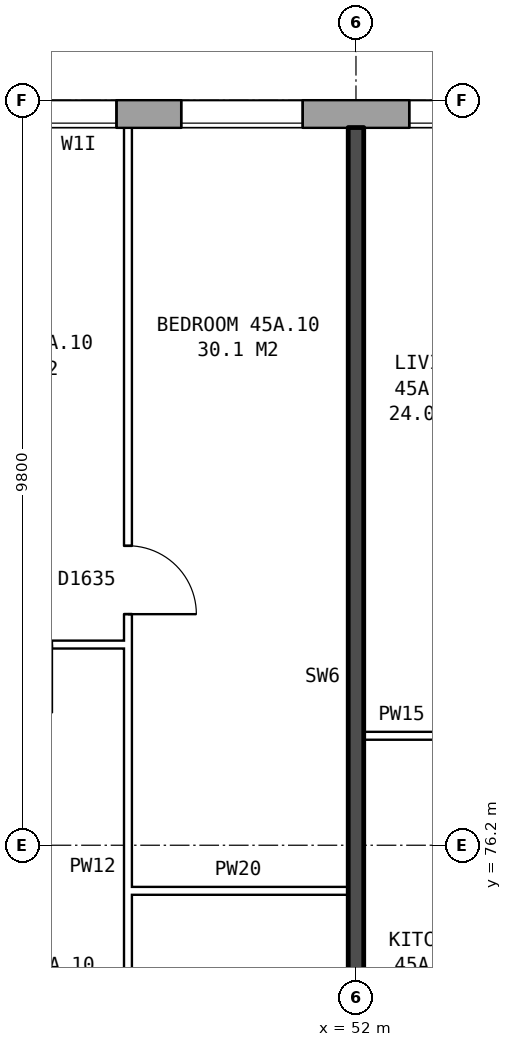
"""IFC4 building model, lengths in metres.
Left out: names, types, materials, properties, quantities, classifications, styles, units other than length and angle.
Written with IfcOpenShell. Run it as: python <this file> out.ifc"""

import sys

from ifc_helpers import new_model, si_unit, direction, frame, frame_2d, origin, place, context, subcontext, project, spatial, rectangle, extrude, element, fill, save


model = new_model("IFC4")
c1 = context("Model", 3, precision=1e-05, world=origin(), true_north=direction((0.0, 1.0)))
c2 = subcontext(c1, "Body", "Model", "MODEL_VIEW")
j1 = project(units=[si_unit("LENGTHUNIT", "METRE"), si_unit("PLANEANGLEUNIT", "RADIAN")], contexts=[c1])
p1 = place(None, origin())
s1 = spatial("IfcSite", under=j1, at=p1, CompositionType="ELEMENT")
p2 = place(p1, origin())
s2 = spatial("IfcBuilding", under=s1, at=p2, CompositionType="ELEMENT")
p3 = place(p2, frame((0.0, 0.0, 160.9)))
s3 = spatial("IfcBuildingStorey", under=s2, at=p3, CompositionType="ELEMENT", Elevation=160.9)
p4 = place(p3, frame((72.925, 85.82, 0.0), z_axis=(0.0, 0.0, 1.0), x_axis=(-1.0, 0.0, 0.0)))
e1 = element("IfcWall", 1, at=p4, inside=s3, PredefinedType="STANDARD", context=c2, shape_type="SweptSolid", body=[
    extrude(rectangle(XDim=41.351, YDim=0.36, at=frame_2d((20.675, 0.0))), origin(), (0.0, 0.0, 1.0), 2.85),
])
p5 = place(p4, frame((0.625, 0.0, 0.8)))
e2 = element("IfcOpeningElement", 2, at=p5, cuts=e1, PredefinedType="OPENING", context=c2, shape_type="SweptSolid", body=[
    extrude(rectangle(XDim=1.6, YDim=1.8, at=frame_2d((0.8, 0.9))), frame((0.0, 0.19, 0.0), z_axis=(0.0, -1.0, 0.0), x_axis=(1.0, 0.0, 0.0)), (0.0, 0.0, 1.0), 0.38),
])
p6 = place(p4, frame((3.625, 0.0, 0.8)))
e3 = element("IfcOpeningElement", 3, at=p6, cuts=e1, PredefinedType="OPENING", context=c2, shape_type="SweptSolid", body=[
    extrude(rectangle(XDim=1.6, YDim=1.8, at=frame_2d((0.8, 0.9))), frame((0.0, 0.19, 0.0), z_axis=(0.0, -1.0, 0.0), x_axis=(1.0, 0.0, 0.0)), (0.0, 0.0, 1.0), 0.38),
])
p7 = place(p4, frame((6.625, 0.0, 0.8)))
e4 = element("IfcOpeningElement", 4, at=p7, cuts=e1, PredefinedType="OPENING", context=c2, shape_type="SweptSolid", body=[
    extrude(rectangle(XDim=1.6, YDim=1.8, at=frame_2d((0.8, 0.9))), frame((0.0, 0.19, 0.0), z_axis=(0.0, -1.0, 0.0), x_axis=(1.0, 0.0, 0.0)), (0.0, 0.0, 1.0), 0.38),
])
p8 = place(p4, frame((9.625, 0.0, 0.8)))
e5 = element("IfcOpeningElement", 5, at=p8, cuts=e1, PredefinedType="OPENING", context=c2, shape_type="SweptSolid", body=[
    extrude(rectangle(XDim=1.6, YDim=1.8, at=frame_2d((0.8, 0.9))), frame((0.0, 0.19, 0.0), z_axis=(0.0, -1.0, 0.0), x_axis=(1.0, 0.0, 0.0)), (0.0, 0.0, 1.0), 0.38),
])
p9 = place(p4, frame((12.075, 0.0, 0.8)))
e6 = element("IfcOpeningElement", 6, at=p9, cuts=e1, PredefinedType="OPENING", context=c2, shape_type="SweptSolid", body=[
    extrude(rectangle(XDim=1.6, YDim=1.8, at=frame_2d((0.8, 0.9))), frame((0.0, 0.19, 0.0), z_axis=(0.0, -1.0, 0.0), x_axis=(1.0, 0.0, 0.0)), (0.0, 0.0, 1.0), 0.38),
])
p10 = place(p4, frame((15.375, 0.0, 0.25)))
e7 = element("IfcOpeningElement", 7, at=p10, cuts=e1, PredefinedType="OPENING", context=c2, shape_type="SweptSolid", body=[
    extrude(rectangle(XDim=0.8, YDim=0.9, at=frame_2d((0.4, 0.45))), frame((0.0, 0.19, 0.0), z_axis=(0.0, -1.0, 0.0), x_axis=(1.0, 0.0, 0.0)), (0.0, 0.0, 1.0), 0.38),
])
p11 = place(p4, frame((18.625, 0.0, 0.8)))
e8 = element("IfcOpeningElement", 8, at=p11, cuts=e1, PredefinedType="OPENING", context=c2, shape_type="SweptSolid", body=[
    extrude(rectangle(XDim=1.6, YDim=1.8, at=frame_2d((0.8, 0.9))), frame((0.0, 0.19, 0.0), z_axis=(0.0, -1.0, 0.0), x_axis=(1.0, 0.0, 0.0)), (0.0, 0.0, 1.0), 0.38),
])
p12 = place(p4, frame((21.625, 0.0, 0.8)))
e9 = element("IfcOpeningElement", 9, at=p12, cuts=e1, PredefinedType="OPENING", context=c2, shape_type="SweptSolid", body=[
    extrude(rectangle(XDim=1.6, YDim=1.8, at=frame_2d((0.8, 0.9))), frame((0.0, 0.19, 0.0), z_axis=(0.0, -1.0, 0.0), x_axis=(1.0, 0.0, 0.0)), (0.0, 0.0, 1.0), 0.38),
])
p13 = place(p4, frame((24.075, 0.0, 0.35)))
e10 = element("IfcOpeningElement", 10, at=p13, cuts=e1, PredefinedType="OPENING", context=c2, shape_type="SweptSolid", body=[
    extrude(rectangle(XDim=1.0, YDim=1.5, at=frame_2d((0.5, 0.75))), frame((0.0, 0.19, 0.0), z_axis=(0.0, -1.0, 0.0), x_axis=(1.0, 0.0, 0.0)), (0.0, 0.0, 1.0), 0.38),
])
p14 = place(p4, frame((27.625, 0.0, 0.8)))
e11 = element("IfcOpeningElement", 11, at=p14, cuts=e1, PredefinedType="OPENING", context=c2, shape_type="SweptSolid", body=[
    extrude(rectangle(XDim=1.6, YDim=1.8, at=frame_2d((0.8, 0.9))), frame((0.0, 0.19, 0.0), z_axis=(0.0, -1.0, 0.0), x_axis=(1.0, 0.0, 0.0)), (0.0, 0.0, 1.0), 0.38),
])
p15 = place(p4, frame((30.625, 0.0, 0.8)))
e12 = element("IfcOpeningElement", 12, at=p15, cuts=e1, PredefinedType="OPENING", context=c2, shape_type="SweptSolid", body=[
    extrude(rectangle(XDim=1.6, YDim=1.8, at=frame_2d((0.8, 0.9))), frame((0.0, 0.19, 0.0), z_axis=(0.0, -1.0, 0.0), x_axis=(1.0, 0.0, 0.0)), (0.0, 0.0, 1.0), 0.38),
])
p16 = place(p4, frame((33.625, 0.0, 0.8)))
e13 = element("IfcOpeningElement", 13, at=p16, cuts=e1, PredefinedType="OPENING", context=c2, shape_type="SweptSolid", body=[
    extrude(rectangle(XDim=1.6, YDim=1.8, at=frame_2d((0.8, 0.9))), frame((0.0, 0.19, 0.0), z_axis=(0.0, -1.0, 0.0), x_axis=(1.0, 0.0, 0.0)), (0.0, 0.0, 1.0), 0.38),
])
p17 = place(p4, frame((36.625, 0.0, 0.8)))
e14 = element("IfcOpeningElement", 14, at=p17, cuts=e1, PredefinedType="OPENING", context=c2, shape_type="SweptSolid", body=[
    extrude(rectangle(XDim=1.6, YDim=1.8, at=frame_2d((0.8, 0.9))), frame((0.0, 0.19, 0.0), z_axis=(0.0, -1.0, 0.0), x_axis=(1.0, 0.0, 0.0)), (0.0, 0.0, 1.0), 0.38),
])
p18 = place(p4, frame((13.975, 0.0, 1.5)))
e15 = element("IfcOpeningElement", 15, at=p18, cuts=e1, PredefinedType="OPENING", context=c2, shape_type="SweptSolid", body=[
    extrude(rectangle(XDim=0.6, YDim=0.9, at=frame_2d((0.3, 0.45))), frame((0.0, 0.19, 0.0), z_axis=(0.0, -1.0, 0.0), x_axis=(1.0, 0.0, 0.0)), (0.0, 0.0, 1.0), 0.38),
])
p19 = place(p4, frame((16.525, 0.0, 0.25)))
e16 = element("IfcOpeningElement", 16, at=p19, cuts=e1, PredefinedType="OPENING", context=c2, shape_type="SweptSolid", body=[
    extrude(rectangle(XDim=1.2, YDim=1.8, at=frame_2d((0.6, 0.9))), frame((0.0, 0.19, 0.0), z_axis=(0.0, -1.0, 0.0), x_axis=(1.0, 0.0, 0.0)), (0.0, 0.0, 1.0), 0.38),
])
p20 = place(p4, frame((25.375, 0.0, 0.25)))
e17 = element("IfcOpeningElement", 17, at=p20, cuts=e1, PredefinedType="OPENING", context=c2, shape_type="SweptSolid", body=[
    extrude(rectangle(XDim=0.6, YDim=0.9, at=frame_2d((0.3, 0.45))), frame((0.0, 0.19, 0.0), z_axis=(0.0, -1.0, 0.0), x_axis=(1.0, 0.0, 0.0)), (0.0, 0.0, 1.0), 0.38),
])
p21 = place(p3, frame((49.0, 75.6, 0.0), z_axis=(0.0, 0.0, 1.0), x_axis=(1.0, 0.0, 0.0)))
e18 = element("IfcWall", 18, at=p21, inside=s3, PredefinedType="PARTITIONING", context=c2, shape_type="SweptSolid", body=[
    extrude(rectangle(XDim=2.9, YDim=0.1, at=frame_2d((1.45, 0.0))), origin(), (0.0, 0.0, 1.0), 2.85),
])
p22 = place(p3, frame((52.1, 77.64, 0.0), z_axis=(0.0, 0.0, 1.0), x_axis=(1.0, 0.0, 0.0)))
e19 = element("IfcWall", 19, at=p22, inside=s3, PredefinedType="PARTITIONING", context=c2, shape_type="SweptSolid", body=[
    extrude(rectangle(XDim=2.9, YDim=0.1, at=frame_2d((1.45, 0.0))), origin(), (0.0, 0.0, 1.0), 2.85),
])
p23 = place(p22, frame((1.0, 0.0, 0.0)))
e20 = element("IfcOpeningElement", 20, at=p23, cuts=e19, PredefinedType="OPENING", context=c2, shape_type="SweptSolid", body=[
    extrude(rectangle(XDim=0.9, YDim=2.1, at=frame_2d((0.45, 1.05))), frame((0.0, 0.06, 0.0), z_axis=(0.0, -1.0, 0.0), x_axis=(1.0, 0.0, 0.0)), (0.0, 0.0, 1.0), 0.12),
])
p24 = place(p3, frame((46.1, 78.84, 0.0), z_axis=(0.0, 0.0, 1.0), x_axis=(1.0, 0.0, 0.0)))
e21 = element("IfcWall", 21, at=p24, inside=s3, PredefinedType="PARTITIONING", context=c2, shape_type="SweptSolid", body=[
    extrude(rectangle(XDim=2.9, YDim=0.1, at=frame_2d((1.45, 0.0))), origin(), (0.0, 0.0, 1.0), 2.85),
])
p25 = place(p24, frame((1.0, 0.0, 0.0)))
e22 = element("IfcOpeningElement", 22, at=p25, cuts=e21, PredefinedType="OPENING", context=c2, shape_type="SweptSolid", body=[
    extrude(rectangle(XDim=0.9, YDim=2.1, at=frame_2d((0.45, 1.05))), frame((0.0, 0.06, 0.0), z_axis=(0.0, -1.0, 0.0), x_axis=(1.0, 0.0, 0.0)), (0.0, 0.0, 1.0), 0.12),
])
p26 = place(p3, frame((49.0, 71.3, 0.0), z_axis=(0.0, 0.0, 1.0), x_axis=(0.0, 1.0, 0.0)))
e23 = element("IfcWall", 23, at=p26, inside=s3, PredefinedType="PARTITIONING", context=c2, shape_type="SweptSolid", body=[
    extrude(rectangle(XDim=14.34, YDim=0.1, at=frame_2d((7.17, 0.0))), origin(), (0.0, 0.0, 1.0), 2.85),
])
p27 = place(p26, frame((7.94, 0.0, 0.0)))
e24 = element("IfcOpeningElement", 24, at=p27, cuts=e23, PredefinedType="OPENING", context=c2, shape_type="SweptSolid", body=[
    extrude(rectangle(XDim=0.9, YDim=2.1, at=frame_2d((0.45, 1.05))), frame((0.0, 0.06, 0.0), z_axis=(0.0, -1.0, 0.0), x_axis=(1.0, 0.0, 0.0)), (0.0, 0.0, 1.0), 0.12),
])
p28 = place(p26, frame((0.4, 0.0, 0.0)))
e25 = element("IfcOpeningElement", 25, at=p28, cuts=e23, PredefinedType="OPENING", context=c2, shape_type="SweptSolid", body=[
    extrude(rectangle(XDim=0.9, YDim=2.1, at=frame_2d((0.45, 1.05))), frame((0.0, 0.06, 0.0), z_axis=(0.0, -1.0, 0.0), x_axis=(1.0, 0.0, 0.0)), (0.0, 0.0, 1.0), 0.12),
])
p29 = place(p3, frame((52.0, 71.2, 0.0), z_axis=(0.0, 0.0, 1.0), x_axis=(0.0, 1.0, 0.0)))
e26 = element("IfcWall", 26, at=p29, inside=s3, PredefinedType="SOLIDWALL", context=c2, shape_type="SweptSolid", body=[
    extrude(rectangle(XDim=14.44, YDim=0.2, at=frame_2d((7.22, 0.0))), origin(), (0.0, 0.0, 1.0), 2.85),
])
p30 = place(p11, origin())
e27 = element("IfcWindow", 27, at=p30, inside=s3, PartitioningType="SINGLE_PANEL", PredefinedType="WINDOW", context=c2, shape_type="SweptSolid", body=[
    extrude(rectangle(XDim=1.6, YDim=1.8, at=frame_2d((0.8, 0.9))), frame((0.0, 0.15, 0.0), z_axis=(0.0, -1.0, 0.0), x_axis=(1.0, 0.0, 0.0)), (0.0, 0.0, 1.0), 0.06),
])
fill(e8, e27)
p31 = place(p12, origin())
e28 = element("IfcWindow", 28, at=p31, inside=s3, PartitioningType="SINGLE_PANEL", PredefinedType="WINDOW", context=c2, shape_type="SweptSolid", body=[
    extrude(rectangle(XDim=1.6, YDim=1.8, at=frame_2d((0.8, 0.9))), frame((0.0, 0.15, 0.0), z_axis=(0.0, -1.0, 0.0), x_axis=(1.0, 0.0, 0.0)), (0.0, 0.0, 1.0), 0.06),
])
fill(e9, e28)
p32 = place(p13, origin())
e29 = element("IfcWindow", 29, at=p32, inside=s3, PartitioningType="SINGLE_PANEL", PredefinedType="WINDOW", context=c2, shape_type="SweptSolid", body=[
    extrude(rectangle(XDim=1.0, YDim=1.5, at=frame_2d((0.5, 0.75))), frame((0.0, 0.15, 0.0), z_axis=(0.0, -1.0, 0.0), x_axis=(1.0, 0.0, 0.0)), (0.0, 0.0, 1.0), 0.06),
])
fill(e10, e29)
p33 = place(p27, frame((0.9, 0.0, 0.0), z_axis=(0.0, 0.0, 1.0), x_axis=(-1.0, 0.0, 0.0)))
e30 = element("IfcDoor", 30, at=p33, inside=s3, OperationType="SINGLE_SWING_RIGHT", PredefinedType="DOOR", context=c2, shape_type="SweptSolid", body=[
    extrude(rectangle(XDim=0.9, YDim=2.1, at=frame_2d((0.45, 1.05))), frame((0.0, 0.025, 0.0), z_axis=(0.0, -1.0, 0.0), x_axis=(1.0, 0.0, 0.0)), (0.0, 0.0, 1.0), 0.05),
])
fill(e24, e30)
save(model, sys.argv[1])
